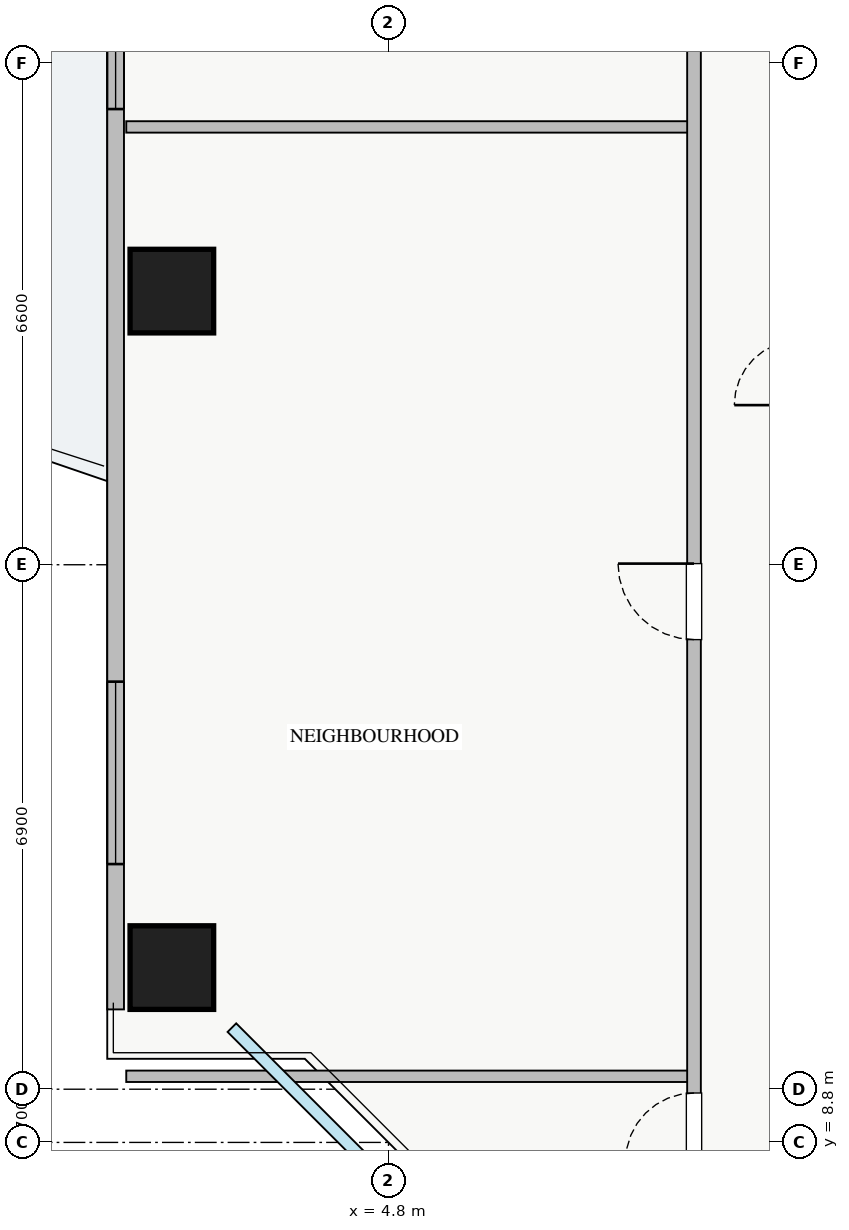
"""IFC4 building model, lengths in metres.
Left out: names, types, materials, properties, quantities, classifications, styles, units other than length and angle.
Written with IfcOpenShell. Run it as: python <this file> out.ifc"""

import sys

from ifc_helpers import new_model, si_unit, direction, frame, frame_2d, origin, origin_2d, place, context, subcontext, project, spatial, rectangle, extrude, source, transform, mapped, element, fill, save


model = new_model("IFC4")
c1 = context("Model", 3, precision=1e-05, world=origin(), true_north=direction((0.0, 1.0)))
c2 = subcontext(c1, "Body", "Model", "MODEL_VIEW")
j1 = project(units=[si_unit("LENGTHUNIT", "METRE"), si_unit("PLANEANGLEUNIT", "RADIAN")], contexts=[c1])
p1 = place(None, origin())
s1 = spatial("IfcSite", under=j1, at=p1, CompositionType="ELEMENT")
p2 = place(p1, origin())
s2 = spatial("IfcBuilding", under=s1, at=p2, CompositionType="ELEMENT")
p3 = place(p2, frame((0.0, 0.0, 136.0)))
s3 = spatial("IfcBuildingStorey", under=s2, at=p3, CompositionType="ELEMENT", Elevation=136.0)
m1 = source(origin(), c2, "Body", "SweptSolid", [
    extrude(rectangle(XDim=1.1, YDim=1.1, at=origin_2d()), origin(), (0.0, 0.0, 1.0), 3.25),
])
for number, where, z_axis, x_axis in (
    (1, (1.95, 20.0, 0.0), (0.0, 0.0, 1.0), (1.0, 0.0, 0.0)),
    (2, (1.95, 11.1, 0.0), (0.0, 0.0, 1.0), (1.0, 0.0, 0.0)),
):
    element("IfcColumn", number, at=place(p3, frame(where, z_axis=z_axis, x_axis=x_axis)), inside=s3, PredefinedType="COLUMN", context=c2, shape_type="MappedRepresentation", body=[
        mapped(m1, transform((0.0, 0.0, 0.0), x_axis=(1.0, 0.0, 0.0), y_axis=(0.0, 1.0, 0.0), z_axis=(0.0, 0.0, 1.0), scale=1.0)),
    ])
p4 = place(p3, frame((1.21, 10.55, 0.0), z_axis=(0.0, 0.0, 1.0), x_axis=(0.0, 1.0, 0.0)))
e3 = element("IfcWall", 3, at=p4, inside=s3, PredefinedType="STANDARD", context=c2, shape_type="SweptSolid", body=[
    extrude(rectangle(XDim=24.9, YDim=0.22, at=frame_2d((12.45, 0.0))), origin(), (0.0, 0.0, 1.0), 2.57),
])
p5 = place(p4, frame((13.3, 0.0, 0.0)))
e4 = element("IfcOpeningElement", 4, at=p5, cuts=e3, PredefinedType="OPENING", context=c2, shape_type="SweptSolid", body=[
    extrude(rectangle(XDim=1.2, YDim=2.1, at=frame_2d((0.6, 1.05))), frame((0.0, 0.12, 0.0), z_axis=(0.0, -1.0, 0.0), x_axis=(1.0, 0.0, 0.0)), (0.0, 0.0, 1.0), 0.24),
])
p6 = place(p4, frame((1.912, 0.0, 0.9)))
e5 = element("IfcOpeningElement", 5, at=p6, cuts=e3, PredefinedType="OPENING", context=c2, shape_type="SweptSolid", body=[
    extrude(rectangle(XDim=2.4, YDim=1.48, at=frame_2d((1.2, 0.74))), frame((0.0, 0.12, 0.0), z_axis=(0.0, -1.0, 0.0), x_axis=(1.0, 0.0, 0.0)), (0.0, 0.0, 1.0), 0.24),
])
p7 = place(p4, frame((20.737, 0.0, 0.9)))
e6 = element("IfcOpeningElement", 6, at=p7, cuts=e3, PredefinedType="OPENING", context=c2, shape_type="SweptSolid", body=[
    extrude(rectangle(XDim=2.1, YDim=1.48, at=frame_2d((1.05, 0.74))), frame((0.0, 0.12, 0.0), z_axis=(0.0, -1.0, 0.0), x_axis=(1.0, 0.0, 0.0)), (0.0, 0.0, 1.0), 0.24),
])
p8 = place(p4, frame((11.845, 0.0, 0.9)))
e7 = element("IfcOpeningElement", 7, at=p8, cuts=e3, PredefinedType="OPENING", context=c2, shape_type="SweptSolid", body=[
    extrude(rectangle(XDim=0.9, YDim=1.2, at=frame_2d((0.45, 0.6))), frame((0.0, 0.12, 0.0), z_axis=(0.0, -1.0, 0.0), x_axis=(1.0, 0.0, 0.0)), (0.0, 0.0, 1.0), 0.24),
])
for number, where, z_axis, x_axis in (
    (8, (1.35, 9.67, 0.0), (0.0, 0.0, 1.0), (1.0, 0.0, 0.0)),
    (9, (1.35, 22.16, 0.0), (0.0, 0.0, 1.0), (1.0, 0.0, 0.0)),
):
    element("IfcWall", number, at=place(p3, frame(where, z_axis=z_axis, x_axis=x_axis)), inside=s3, PredefinedType="PARTITIONING", context=c2, shape_type="SweptSolid", body=[
        extrude(rectangle(XDim=7.47, YDim=0.15, at=frame_2d((3.735, 0.0))), origin(), (0.0, 0.0, 1.0), 3.03),
    ])
p9 = place(p3, frame((8.82, 8.31, 0.0), z_axis=(0.0, 0.0, 1.0), x_axis=(0.0, 1.0, 0.0)))
e10 = element("IfcWall", 10, at=p9, inside=s3, PredefinedType="PARTITIONING", context=c2, shape_type="SweptSolid", body=[
    extrude(rectangle(XDim=29.13, YDim=0.18, at=frame_2d((14.565, 0.0))), origin(), (0.0, 0.0, 1.0), 3.03),
])
p10 = place(p9, frame((27.94, 0.0, 0.0)))
e11 = element("IfcOpeningElement", 11, at=p10, cuts=e10, PredefinedType="OPENING", context=c2, shape_type="SweptSolid", body=[
    extrude(rectangle(XDim=0.9, YDim=2.05, at=frame_2d((0.45, 1.025))), frame((0.0, 0.1, 0.0), z_axis=(0.0, -1.0, 0.0), x_axis=(1.0, 0.0, 0.0)), (0.0, 0.0, 1.0), 0.2),
])
p11 = place(p9, frame((0.24, 0.0, 0.0)))
e12 = element("IfcOpeningElement", 12, at=p11, cuts=e10, PredefinedType="OPENING", context=c2, shape_type="SweptSolid", body=[
    extrude(rectangle(XDim=0.9, YDim=2.05, at=frame_2d((0.45, 1.025))), frame((0.0, 0.1, 0.0), z_axis=(0.0, -1.0, 0.0), x_axis=(1.0, 0.0, 0.0)), (0.0, 0.0, 1.0), 0.2),
])
p12 = place(p9, frame((7.105, 0.0, 0.0)))
e13 = element("IfcOpeningElement", 13, at=p12, cuts=e10, PredefinedType="OPENING", context=c2, shape_type="SweptSolid", body=[
    extrude(rectangle(XDim=1.0, YDim=2.05, at=frame_2d((0.5, 1.025))), frame((0.0, 0.1, 0.0), z_axis=(0.0, -1.0, 0.0), x_axis=(1.0, 0.0, 0.0)), (0.0, 0.0, 1.0), 0.2),
])
p13 = place(p9, frame((16.475, 0.0, 0.0)))
e14 = element("IfcOpeningElement", 14, at=p13, cuts=e10, PredefinedType="OPENING", context=c2, shape_type="SweptSolid", body=[
    extrude(rectangle(XDim=1.0, YDim=2.05, at=frame_2d((0.5, 1.025))), frame((0.0, 0.1, 0.0), z_axis=(0.0, -1.0, 0.0), x_axis=(1.0, 0.0, 0.0)), (0.0, 0.0, 1.0), 0.2),
])
m2 = source(origin(), c2, "Body", "SweptSolid", [
    extrude(rectangle(XDim=2.4, YDim=1.48, at=frame_2d((1.2, 0.74))), frame((0.0, 0.03, 0.0), z_axis=(0.0, -1.0, 0.0), x_axis=(1.0, 0.0, 0.0)), (0.0, 0.0, 1.0), 0.06),
])
p14 = place(p6, origin())
e15 = element("IfcWindow", 15, at=p14, inside=s3, PartitioningType="TRIPLE_PANEL_VERTICAL", PredefinedType="WINDOW", context=c2, shape_type="MappedRepresentation", body=[
    mapped(m2, transform((0.0, 0.0, 0.0), x_axis=(1.0, 0.0, 0.0), y_axis=(0.0, 1.0, 0.0), z_axis=(0.0, 0.0, 1.0), scale=1.0)),
])
fill(e5, e15)
m3 = source(origin(), c2, "Body", "SweptSolid", [
    extrude(rectangle(XDim=0.9, YDim=2.05, at=frame_2d((0.45, 1.025))), frame((0.0, 0.025, 0.0), z_axis=(0.0, -1.0, 0.0), x_axis=(1.0, 0.0, 0.0)), (0.0, 0.0, 1.0), 0.05),
])
p15 = place(p11, origin())
e16 = element("IfcDoor", 16, at=p15, inside=s3, OperationType="SINGLE_SWING_LEFT", PredefinedType="DOOR", context=c2, shape_type="MappedRepresentation", body=[
    mapped(m3, transform((0.0, 0.0, 0.0), x_axis=(1.0, 0.0, 0.0), y_axis=(0.0, 1.0, 0.0), z_axis=(0.0, 0.0, 1.0), scale=1.0)),
])
fill(e12, e16)
m4 = source(origin(), c2, "Body", "SweptSolid", [
    extrude(rectangle(XDim=1.0, YDim=2.05, at=frame_2d((0.5, 1.025))), frame((0.0, 0.025, 0.0), z_axis=(0.0, -1.0, 0.0), x_axis=(1.0, 0.0, 0.0)), (0.0, 0.0, 1.0), 0.05),
])
p16 = place(p12, origin())
e17 = element("IfcDoor", 17, at=p16, inside=s3, OperationType="SINGLE_SWING_RIGHT", PredefinedType="DOOR", context=c2, shape_type="MappedRepresentation", body=[
    mapped(m4, transform((0.0, 0.0, 0.0), x_axis=(1.0, 0.0, 0.0), y_axis=(0.0, 1.0, 0.0), z_axis=(0.0, 0.0, 1.0), scale=1.0)),
])
fill(e13, e17)
m5 = source(origin(), c2, "Body", "SweptSolid", [
    extrude(rectangle(XDim=0.9, YDim=1.2, at=frame_2d((0.45, 0.6))), frame((0.0, 0.03, 0.0), z_axis=(0.0, -1.0, 0.0), x_axis=(1.0, 0.0, 0.0)), (0.0, 0.0, 1.0), 0.06),
])
p17 = place(p8, origin())
e18 = element("IfcWindow", 18, at=p17, inside=s3, PartitioningType="SINGLE_PANEL", PredefinedType="WINDOW", context=c2, shape_type="MappedRepresentation", body=[
    mapped(m5, transform((0.0, 0.0, 0.0), x_axis=(1.0, 0.0, 0.0), y_axis=(0.0, 1.0, 0.0), z_axis=(0.0, 0.0, 1.0), scale=1.0)),
])
fill(e7, e18)
save(model, sys.argv[1])
